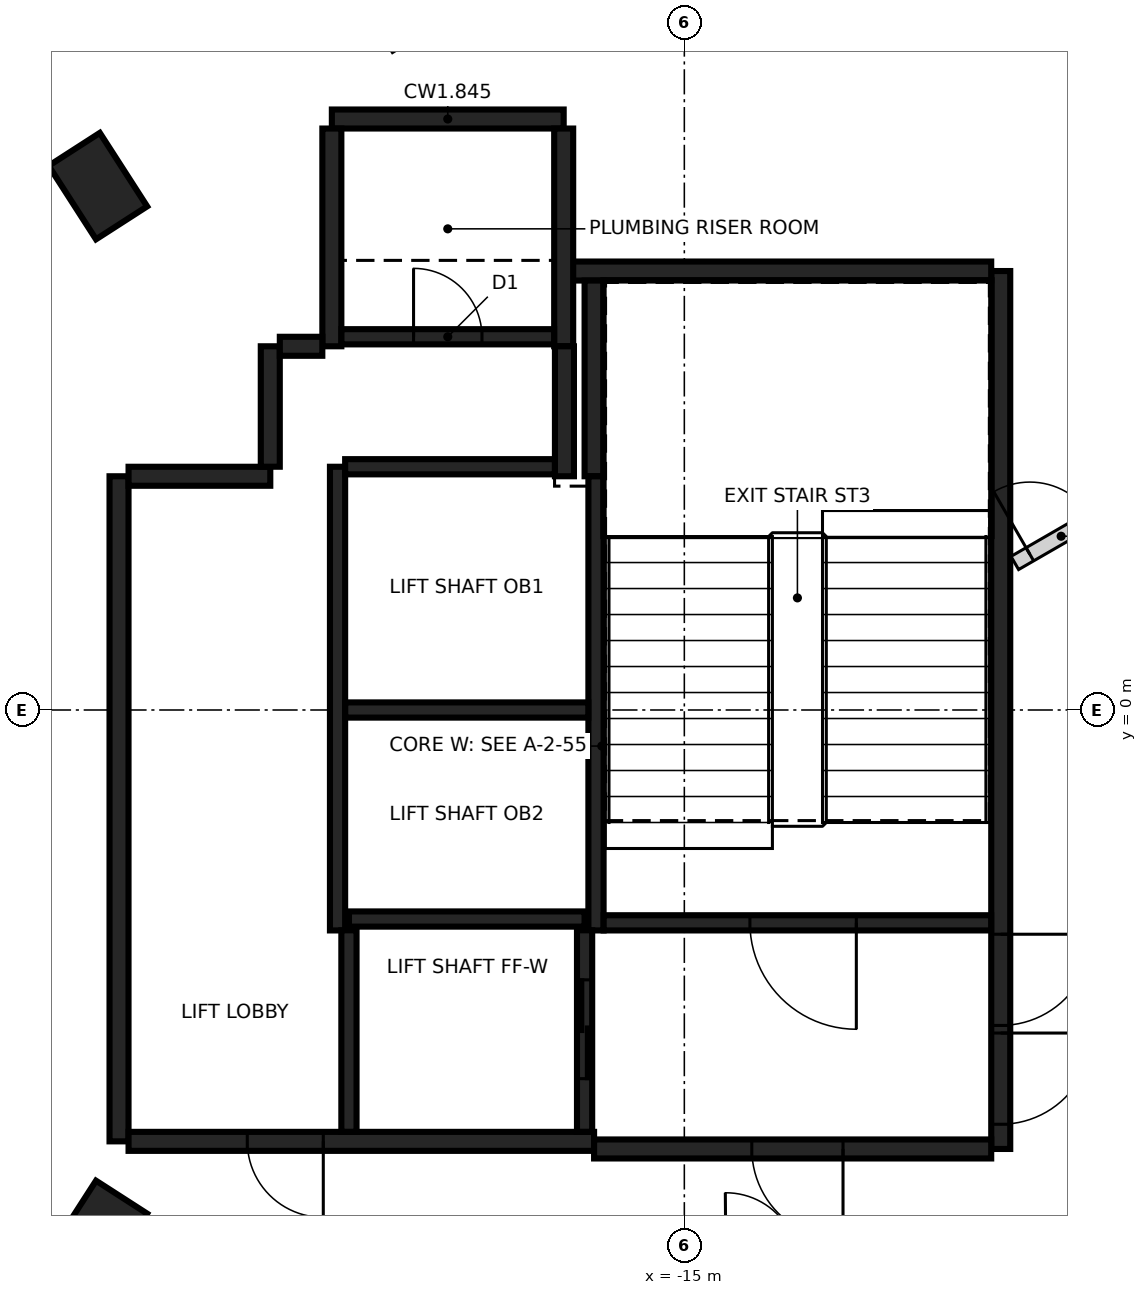
"""IFC4 building model, lengths in metres.
Left out: names, types, materials, properties, quantities, classifications, styles, units other than length and angle.
Written with IfcOpenShell. Run it as: python <this file> out.ifc"""

import sys

from ifc_helpers import new_model, si_unit, direction, frame, frame_2d, origin, origin_2d, place, context, subcontext, project, spatial, rectangle, extrude, element, fill, save


model = new_model("IFC4")
c1 = context("Model", 3, precision=1e-05, world=origin(), true_north=direction((0.0, 1.0)))
c2 = subcontext(c1, "Body", "Model", "MODEL_VIEW")
j1 = project(units=[si_unit("LENGTHUNIT", "METRE"), si_unit("PLANEANGLEUNIT", "RADIAN")], contexts=[c1])
p1 = place(None, origin())
s1 = spatial("IfcSite", under=j1, at=p1, CompositionType="ELEMENT")
p2 = place(p1, origin())
s2 = spatial("IfcBuilding", under=s1, at=p2, CompositionType="ELEMENT")
p3 = place(p2, frame((0.0, 0.0, 190.0)))
s3 = spatial("IfcBuildingStorey", under=s2, at=p3, CompositionType="ELEMENT", Elevation=190.0)
for number, where, z_axis, x_axis in (
    (1, (-22.715, 6.892, -0.35), (0.0, 0.0, 1.0), (-0.541, 0.841, 0.0)),
    (2, (-22.715, -6.892, -0.35), (0.0, 0.0, 1.0), (0.541, 0.841, 0.0)),
):
    element("IfcColumn", number, at=place(p3, frame(where, z_axis=z_axis, x_axis=x_axis)), inside=s3, PredefinedType="COLUMN", context=c2, shape_type="SweptSolid", body=[
        extrude(rectangle(XDim=1.15, YDim=0.8, at=origin_2d()), origin(), (0.0, 0.0, 1.0), 3.6),
    ])
p4 = place(p3, frame((-10.837, 5.775, 0.0), z_axis=(0.0, 0.0, 1.0), x_axis=(0.0, -1.0, 0.0)))
e3 = element("IfcWall", 3, at=p4, inside=s3, PredefinedType="SHEAR", context=c2, shape_type="SweptSolid", body=[
    extrude(rectangle(XDim=11.55, YDim=0.25, at=frame_2d((5.775, 0.0))), origin(), (0.0, 0.0, 1.0), 3.25),
])
p5 = place(p4, frame((10.025, 0.0, 0.0)))
e4 = element("IfcOpeningElement", 4, at=p5, cuts=e3, PredefinedType="OPENING", context=c2, shape_type="SweptSolid", body=[
    extrude(rectangle(XDim=1.2, YDim=2.1, at=frame_2d((0.6, 1.05))), frame((0.0, 0.135, 0.0), z_axis=(0.0, -1.0, 0.0), x_axis=(1.0, 0.0, 0.0)), (0.0, 0.0, 1.0), 0.27),
])
p6 = place(p4, frame((8.725, 0.0, 0.0)))
e5 = element("IfcOpeningElement", 5, at=p6, cuts=e3, PredefinedType="OPENING", context=c2, shape_type="SweptSolid", body=[
    extrude(rectangle(XDim=1.2, YDim=2.1, at=frame_2d((0.6, 1.05))), frame((0.0, 0.135, 0.0), z_axis=(0.0, -1.0, 0.0), x_axis=(1.0, 0.0, 0.0)), (0.0, 0.0, 1.0), 0.27),
])
p7 = place(p3, frame((-22.437, -5.675, 0.0), z_axis=(0.0, 0.0, 1.0), x_axis=(0.0, 1.0, 0.0)))
e6 = element("IfcWall", 6, at=p7, inside=s3, PredefinedType="SHEAR", context=c2, shape_type="SweptSolid", body=[
    extrude(rectangle(XDim=8.75, YDim=0.25, at=frame_2d((4.375, 0.0))), origin(), (0.0, 0.0, 1.0), 3.25),
])
p8 = place(p3, frame((-16.187, -5.675, 0.0), z_axis=(0.0, 0.0, 1.0), x_axis=(-1.0, 0.0, 0.0)))
e7 = element("IfcWall", 7, at=p8, inside=s3, PredefinedType="SHEAR", context=c2, shape_type="SweptSolid", body=[
    extrude(rectangle(XDim=6.125, YDim=0.25, at=frame_2d((3.062, 0.0))), origin(), (0.0, 0.0, 1.0), 3.25),
])
p9 = place(p8, frame((3.563, 0.0, 0.0)))
e8 = element("IfcOpeningElement", 8, at=p9, cuts=e7, PredefinedType="OPENING", context=c2, shape_type="SweptSolid", body=[
    extrude(rectangle(XDim=1.0, YDim=2.1, at=frame_2d((0.5, 1.05))), frame((0.0, 0.135, 0.0), z_axis=(0.0, -1.0, 0.0), x_axis=(1.0, 0.0, 0.0)), (0.0, 0.0, 1.0), 0.27),
])
p10 = place(p3, frame((-10.963, -5.775, 0.0), z_axis=(0.0, 0.0, 1.0), x_axis=(-1.0, 0.0, 0.0)))
e9 = element("IfcWall", 9, at=p10, inside=s3, PredefinedType="SHEAR", context=c2, shape_type="SweptSolid", body=[
    extrude(rectangle(XDim=5.225, YDim=0.25, at=frame_2d((2.612, 0.0))), origin(), (0.0, 0.0, 1.0), 3.25),
])
p11 = place(p10, frame((1.95, 0.0, 0.0)))
e10 = element("IfcOpeningElement", 10, at=p11, cuts=e9, PredefinedType="OPENING", context=c2, shape_type="SweptSolid", body=[
    extrude(rectangle(XDim=1.2, YDim=2.1, at=frame_2d((0.6, 1.05))), frame((0.0, 0.135, 0.0), z_axis=(0.0, -1.0, 0.0), x_axis=(1.0, 0.0, 0.0)), (0.0, 0.0, 1.0), 0.27),
])
p12 = place(p3, frame((-16.472, 5.775, 0.0), z_axis=(0.0, 0.0, 1.0), x_axis=(1.0, 0.0, 0.0)))
e11 = element("IfcWall", 11, at=p12, inside=s3, PredefinedType="SHEAR", context=c2, shape_type="SweptSolid", body=[
    extrude(rectangle(XDim=5.51, YDim=0.25, at=frame_2d((2.755, 0.0))), origin(), (0.0, 0.0, 1.0), 3.25),
])
p13 = place(p3, frame((-19.637, 7.775, 0.0), z_axis=(0.0, 0.0, 1.0), x_axis=(1.0, 0.0, 0.0)))
e12 = element("IfcWall", 12, at=p13, inside=s3, PredefinedType="SHEAR", context=c2, shape_type="SweptSolid", body=[
    extrude(rectangle(XDim=3.05, YDim=0.25, at=frame_2d((1.525, 0.0))), origin(), (0.0, 0.0, 1.0), 3.25),
])
for number, where, z_axis, x_axis in (
    (13, (-16.587, 7.65, 0.0), (0.0, 0.0, 1.0), (0.0, -1.0, 0.0)),
    (14, (-19.637, 4.785, 0.0), (0.0, 0.0, 1.0), (0.0, 1.0, 0.0)),
):
    element("IfcWall", number, at=place(p3, frame(where, z_axis=z_axis, x_axis=x_axis)), inside=s3, PredefinedType="SHEAR", context=c2, shape_type="SweptSolid", body=[
        extrude(rectangle(XDim=2.865, YDim=0.25, at=frame_2d((1.432, 0.0))), origin(), (0.0, 0.0, 1.0), 3.25),
    ])
p14 = place(p3, frame((-16.187, 3.075, 0.0), z_axis=(0.0, 0.0, 1.0), x_axis=(0.0, 1.0, 0.0)))
e15 = element("IfcWall", 15, at=p14, inside=s3, PredefinedType="SHEAR", context=c2, shape_type="SweptSolid", body=[
    extrude(rectangle(XDim=2.575, YDim=0.25, at=frame_2d((1.287, 0.0))), origin(), (0.0, 0.0, 1.0), 3.25),
])
p15 = place(p3, frame((-22.312, 3.075, 0.0), z_axis=(0.0, 0.0, 1.0), x_axis=(1.0, 0.0, 0.0)))
e16 = element("IfcWall", 16, at=p15, inside=s3, PredefinedType="SHEAR", context=c2, shape_type="SweptSolid", body=[
    extrude(rectangle(XDim=1.865, YDim=0.25, at=frame_2d((0.932, 0.0))), origin(), (0.0, 0.0, 1.0), 3.25),
])
p16 = place(p3, frame((-16.577, 4.785, 0.0), z_axis=(0.0, 0.0, 1.0), x_axis=(0.0, -1.0, 0.0)))
e17 = element("IfcWall", 17, at=p16, inside=s3, PredefinedType="SHEAR", context=c2, shape_type="SweptSolid", body=[
    extrude(rectangle(XDim=1.71, YDim=0.25, at=frame_2d((0.855, 0.0))), origin(), (0.0, 0.0, 1.0), 3.25),
])
p17 = place(p3, frame((-20.447, 3.2, 0.0), z_axis=(0.0, 0.0, 1.0), x_axis=(0.0, 1.0, 0.0)))
e18 = element("IfcWall", 18, at=p17, inside=s3, PredefinedType="SHEAR", context=c2, shape_type="SweptSolid", body=[
    extrude(rectangle(XDim=1.584, YDim=0.25, at=frame_2d((0.792, 0.0))), origin(), (0.0, 0.0, 1.0), 3.25),
])
p18 = place(p3, frame((-20.322, 4.785, 0.0), z_axis=(0.0, 0.0, 1.0), x_axis=(1.0, 0.0, 0.0)))
e19 = element("IfcWall", 19, at=p18, inside=s3, PredefinedType="SHEAR", context=c2, shape_type="SweptSolid", body=[
    extrude(rectangle(XDim=0.559, YDim=0.25, at=frame_2d((0.28, 0.0))), origin(), (0.0, 0.0, 1.0), 3.25),
])
p19 = place(p3, frame((-16.162, 3.074, 0.0), z_axis=(0.0, 0.0, 1.0), x_axis=(0.0, -1.0, 0.0)))
e20 = element("IfcWall", 20, at=p19, inside=s3, PredefinedType="SHEAR", context=c2, shape_type="SweptSolid", body=[
    extrude(rectangle(XDim=5.974, YDim=0.2, at=frame_2d((2.987, 0.0))), origin(), (0.0, 0.0, 1.0), 3.25),
])
p20 = place(p3, frame((-19.562, -2.9, 0.0), z_axis=(0.0, 0.0, 1.0), x_axis=(0.0, 1.0, 0.0)))
e21 = element("IfcWall", 21, at=p20, inside=s3, PredefinedType="SHEAR", context=c2, shape_type="SweptSolid", body=[
    extrude(rectangle(XDim=6.1, YDim=0.2, at=frame_2d((3.05, 0.0))), origin(), (0.0, 0.0, 1.0), 3.25),
])
p21 = place(p3, frame((-10.963, -2.8, 0.0), z_axis=(0.0, 0.0, 1.0), x_axis=(-1.0, 0.0, 0.0)))
e22 = element("IfcWall", 22, at=p21, inside=s3, PredefinedType="SHEAR", context=c2, shape_type="SweptSolid", body=[
    extrude(rectangle(XDim=5.098, YDim=0.2, at=frame_2d((2.549, 0.0))), origin(), (0.0, 0.0, 1.0), 3.25),
])
p22 = place(p21, frame((1.774, 0.0, 0.0)))
e23 = element("IfcOpeningElement", 23, at=p22, cuts=e22, PredefinedType="OPENING", context=c2, shape_type="SweptSolid", body=[
    extrude(rectangle(XDim=1.4, YDim=2.1, at=frame_2d((0.7, 1.05))), frame((0.0, 0.11, 0.0), z_axis=(0.0, -1.0, 0.0), x_axis=(1.0, 0.0, 0.0)), (0.0, 0.0, 1.0), 0.22),
])
p23 = place(p3, frame((-16.263, 0.0, 0.0), z_axis=(0.0, 0.0, 1.0), x_axis=(-1.0, 0.0, 0.0)))
e24 = element("IfcWall", 24, at=p23, inside=s3, PredefinedType="SHEAR", context=c2, shape_type="SweptSolid", body=[
    extrude(rectangle(XDim=3.198, YDim=0.2, at=frame_2d((1.599, 0.0))), origin(), (0.0, 0.0, 1.0), 3.25),
])
p24 = place(p3, frame((-19.511, 4.91, 0.0), z_axis=(0.0, 0.0, 1.0), x_axis=(1.0, 0.0, 0.0)))
e25 = element("IfcWall", 25, at=p24, inside=s3, PredefinedType="SHEAR", context=c2, shape_type="SweptSolid", body=[
    extrude(rectangle(XDim=2.798, YDim=0.2, at=frame_2d((1.399, 0.0))), origin(), (0.0, 0.0, 1.0), 3.25),
])
p25 = place(p24, frame((0.949, 0.0, 0.0)))
e26 = element("IfcOpeningElement", 26, at=p25, cuts=e25, PredefinedType="OPENING", context=c2, shape_type="SweptSolid", body=[
    extrude(rectangle(XDim=0.9, YDim=2.1, at=frame_2d((0.45, 1.05))), frame((0.0, 0.11, 0.0), z_axis=(0.0, -1.0, 0.0), x_axis=(1.0, 0.0, 0.0)), (0.0, 0.0, 1.0), 0.22),
])
p26 = place(p3, frame((-19.462, 3.2, 0.0), z_axis=(0.0, 0.0, 1.0), x_axis=(1.0, 0.0, 0.0)))
e27 = element("IfcWall", 27, at=p26, inside=s3, PredefinedType="SHEAR", context=c2, shape_type="SweptSolid", body=[
    extrude(rectangle(XDim=2.759, YDim=0.2, at=frame_2d((1.379, 0.0))), origin(), (0.0, 0.0, 1.0), 3.25),
])
p27 = place(p3, frame((-19.412, -2.75, 0.0), z_axis=(0.0, 0.0, 1.0), x_axis=(1.0, 0.0, 0.0)))
e28 = element("IfcWall", 28, at=p27, inside=s3, PredefinedType="SHEAR", context=c2, shape_type="SweptSolid", body=[
    extrude(rectangle(XDim=3.1, YDim=0.2, at=frame_2d((1.55, 0.0))), origin(), (0.0, 0.0, 1.0), 3.25),
])
p28 = place(p3, frame((-16.312, -2.898, 0.0), z_axis=(0.0, 0.0, 1.0), x_axis=(0.0, -1.0, 0.0)))
e29 = element("IfcWall", 29, at=p28, inside=s3, PredefinedType="SHEAR", context=c2, shape_type="SweptSolid", body=[
    extrude(rectangle(XDim=2.651, YDim=0.2, at=frame_2d((1.325, 0.0))), origin(), (0.0, 0.0, 1.0), 3.25),
])
p29 = place(p28, frame((0.652, 0.0, 0.0)))
e30 = element("IfcOpeningElement", 30, at=p29, cuts=e29, PredefinedType="OPENING", context=c2, shape_type="SweptSolid", body=[
    extrude(rectangle(XDim=1.3, YDim=2.1, at=frame_2d((0.65, 1.05))), frame((0.0, 0.11, 0.0), z_axis=(0.0, -1.0, 0.0), x_axis=(1.0, 0.0, 0.0)), (0.0, 0.0, 1.0), 0.22),
])
p30 = place(p3, frame((-19.412, -5.549, 0.0), z_axis=(0.0, 0.0, 1.0), x_axis=(0.0, 1.0, 0.0)))
e31 = element("IfcWall", 31, at=p30, inside=s3, PredefinedType="SHEAR", context=c2, shape_type="SweptSolid", body=[
    extrude(rectangle(XDim=2.651, YDim=0.2, at=frame_2d((1.325, 0.0))), origin(), (0.0, 0.0, 1.0), 3.25),
])
p31 = place(p3, frame((-10.652, 1.934, 0.0), z_axis=(0.0, 0.0, 1.0), x_axis=(0.866066882415, 0.499928150021, 0.0)))
e32 = element("IfcWall", 32, at=p31, inside=s3, PredefinedType="PARTITIONING", context=c2, shape_type="SweptSolid", body=[
    extrude(rectangle(XDim=12.98, YDim=0.2, at=frame_2d((6.49, 0.0))), origin(), (0.0, 0.0, 1.0), 3.25),
])
p32 = place(p31, frame((9.439, 0.0, 0.0)))
e33 = element("IfcOpeningElement", 33, at=p32, cuts=e32, PredefinedType="OPENING", context=c2, shape_type="SweptSolid", body=[
    extrude(rectangle(XDim=0.95, YDim=2.1, at=frame_2d((0.475, 1.05))), frame((0.0, 0.11, 0.0), z_axis=(0.0, -1.0, 0.0), x_axis=(1.0, 0.0, 0.0)), (0.0, 0.0, 1.0), 0.22),
])
p33 = place(p31, frame((0.229, 0.0, 0.0)))
e34 = element("IfcOpeningElement", 34, at=p33, cuts=e32, PredefinedType="OPENING", context=c2, shape_type="SweptSolid", body=[
    extrude(rectangle(XDim=0.95, YDim=2.1, at=frame_2d((0.475, 1.05))), frame((0.0, 0.11, 0.0), z_axis=(0.0, -1.0, 0.0), x_axis=(1.0, 0.0, 0.0)), (0.0, 0.0, 1.0), 0.22),
])
p34 = place(p3, frame((-12.067, 16.263, 0.0), z_axis=(0.0, 0.0, 1.0), x_axis=(0.500016190239, -0.866016056144, 0.0)))
e35 = element("IfcWall", 35, at=p34, inside=s3, PredefinedType="PARTITIONING", context=c2, shape_type="SweptSolid", body=[
    extrude(rectangle(XDim=13.118, YDim=0.2, at=frame_2d((6.559, 0.0))), origin(), (0.0, 0.0, 1.0), 3.25),
])
p35 = place(p29, origin())
e36 = element("IfcDoor", 36, at=p35, inside=s3, OperationType="SLIDING_TO_RIGHT", PredefinedType="DOOR", context=c2, shape_type="SweptSolid", body=[
    extrude(rectangle(XDim=1.3, YDim=2.1, at=frame_2d((0.65, 1.05))), frame((0.0, 0.025, 0.0), z_axis=(0.0, -1.0, 0.0), x_axis=(1.0, 0.0, 0.0)), (0.0, 0.0, 1.0), 0.05),
])
fill(e30, e36)
p36 = place(p9, origin())
e37 = element("IfcDoor", 37, at=p36, inside=s3, OperationType="SINGLE_SWING_LEFT", PredefinedType="DOOR", context=c2, shape_type="SweptSolid", body=[
    extrude(rectangle(XDim=1.0, YDim=2.1, at=frame_2d((0.5, 1.05))), frame((0.0, 0.025, 0.0), z_axis=(0.0, -1.0, 0.0), x_axis=(1.0, 0.0, 0.0)), (0.0, 0.0, 1.0), 0.05),
])
fill(e8, e37)
p37 = place(p5, origin())
e38 = element("IfcDoor", 38, at=p37, inside=s3, OperationType="SINGLE_SWING_LEFT", PredefinedType="DOOR", context=c2, shape_type="SweptSolid", body=[
    extrude(rectangle(XDim=1.2, YDim=2.1, at=frame_2d((0.6, 1.05))), frame((0.0, 0.025, 0.0), z_axis=(0.0, -1.0, 0.0), x_axis=(1.0, 0.0, 0.0)), (0.0, 0.0, 1.0), 0.05),
])
fill(e4, e38)
p38 = place(p6, origin())
e39 = element("IfcDoor", 39, at=p38, inside=s3, OperationType="SINGLE_SWING_RIGHT", PredefinedType="DOOR", context=c2, shape_type="SweptSolid", body=[
    extrude(rectangle(XDim=1.2, YDim=2.1, at=frame_2d((0.6, 1.05))), frame((0.0, 0.025, 0.0), z_axis=(0.0, -1.0, 0.0), x_axis=(1.0, 0.0, 0.0)), (0.0, 0.0, 1.0), 0.05),
])
fill(e5, e39)
p39 = place(p22, origin())
e40 = element("IfcDoor", 40, at=p39, inside=s3, OperationType="SINGLE_SWING_RIGHT", PredefinedType="DOOR", context=c2, shape_type="SweptSolid", body=[
    extrude(rectangle(XDim=1.4, YDim=2.1, at=frame_2d((0.7, 1.05))), frame((0.0, 0.025, 0.0), z_axis=(0.0, -1.0, 0.0), x_axis=(1.0, 0.0, 0.0)), (0.0, 0.0, 1.0), 0.05),
])
fill(e23, e40)
p40 = place(p25, origin())
e41 = element("IfcDoor", 41, at=p40, inside=s3, OperationType="SINGLE_SWING_LEFT", PredefinedType="DOOR", context=c2, shape_type="SweptSolid", body=[
    extrude(rectangle(XDim=0.9, YDim=2.1, at=frame_2d((0.45, 1.05))), frame((0.0, 0.025, 0.0), z_axis=(0.0, -1.0, 0.0), x_axis=(1.0, 0.0, 0.0)), (0.0, 0.0, 1.0), 0.05),
])
fill(e26, e41)
p41 = place(p11, origin())
e42 = element("IfcDoor", 42, at=p41, inside=s3, OperationType="SINGLE_SWING_LEFT", PredefinedType="DOOR", context=c2, shape_type="SweptSolid", body=[
    extrude(rectangle(XDim=1.2, YDim=2.1, at=frame_2d((0.6, 1.05))), frame((0.0, 0.025, 0.0), z_axis=(0.0, -1.0, 0.0), x_axis=(1.0, 0.0, 0.0)), (0.0, 0.0, 1.0), 0.05),
])
fill(e10, e42)
p42 = place(p33, origin())
e43 = element("IfcDoor", 43, at=p42, inside=s3, OperationType="SINGLE_SWING_LEFT", PredefinedType="DOOR", context=c2, shape_type="SweptSolid", body=[
    extrude(rectangle(XDim=0.95, YDim=2.1, at=frame_2d((0.475, 1.05))), frame((0.0, 0.025, 0.0), z_axis=(0.0, -1.0, 0.0), x_axis=(1.0, 0.0, 0.0)), (0.0, 0.0, 1.0), 0.05),
])
fill(e34, e43)
save(model, sys.argv[1])
